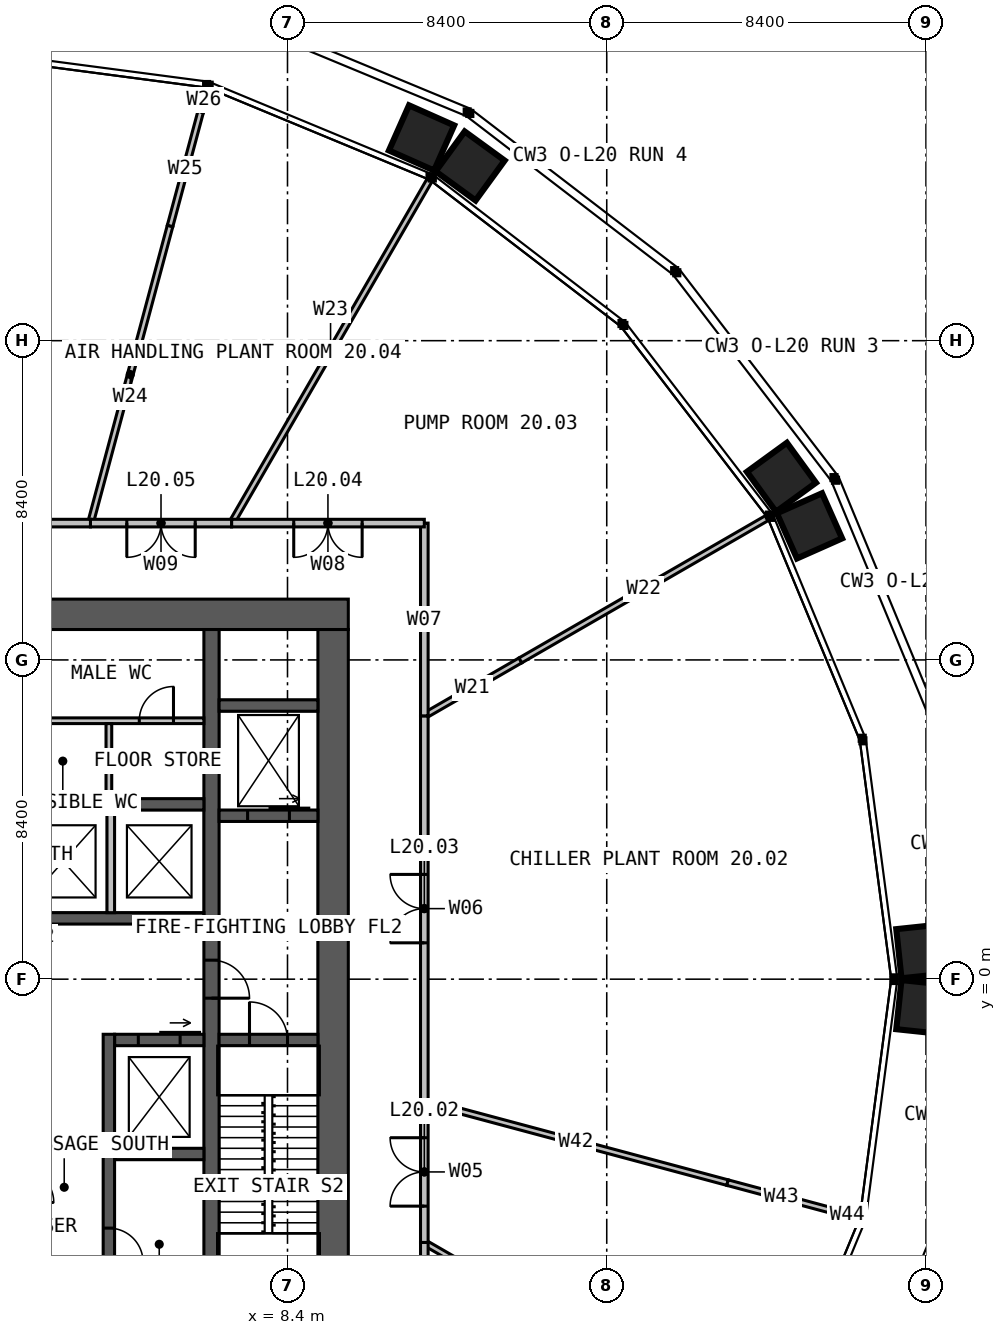
"""IFC4 building model, lengths in metres.
Left out: names, types, materials, properties, quantities, classifications, styles, units other than length and angle.
Written with IfcOpenShell. Run it as: python <this file> out.ifc"""

import sys

from ifc_helpers import new_model, si_unit, direction, frame, frame_2d, origin, place, context, subcontext, project, spatial, rectangle, extrude, element, fill, save


model = new_model("IFC4")
c1 = context("Model", 3, precision=1e-05, world=origin(), true_north=direction((0.0, 1.0)))
c2 = subcontext(c1, "Body", "Model", "MODEL_VIEW")
j1 = project(units=[si_unit("LENGTHUNIT", "METRE"), si_unit("PLANEANGLEUNIT", "RADIAN")], contexts=[c1])
p1 = place(None, origin())
s1 = spatial("IfcSite", under=j1, at=p1, CompositionType="ELEMENT")
p2 = place(p1, origin())
s2 = spatial("IfcBuilding", under=s1, at=p2, CompositionType="ELEMENT")
p3 = place(p2, frame((0.0, 0.0, 85.0)))
s3 = spatial("IfcBuildingStorey", under=s2, at=p3, CompositionType="ELEMENT", Elevation=85.0)
p4 = place(p3, frame((-10.0, 9.6, 0.0), z_axis=(0.0, 0.0, 1.0), x_axis=(1.0, 0.0, 0.0)))
e1 = element("IfcWall", 1, at=p4, inside=s3, PredefinedType="SOLIDWALL", context=c2, shape_type="SweptSolid", body=[
    extrude(rectangle(XDim=20.0, YDim=0.8, at=frame_2d((10.0, 0.0))), origin(), (0.0, 0.0, 1.0), 5.0),
])
p5 = place(p4, frame((9.4, 0.0, 0.0)))
e2 = element("IfcOpeningElement", 2, at=p5, cuts=e1, PredefinedType="OPENING", context=c2, shape_type="SweptSolid", body=[
    extrude(rectangle(XDim=1.2, YDim=2.2, at=frame_2d((0.6, 1.1))), frame((0.0, 0.41, 0.0), z_axis=(0.0, -1.0, 0.0), x_axis=(1.0, 0.0, 0.0)), (0.0, 0.0, 1.0), 0.82),
])
p6 = place(p3, frame((9.6, -9.2, 0.0), z_axis=(0.0, 0.0, 1.0), x_axis=(0.0, 1.0, 0.0)))
e3 = element("IfcWall", 3, at=p6, inside=s3, PredefinedType="SOLIDWALL", context=c2, shape_type="SweptSolid", body=[
    extrude(rectangle(XDim=18.4, YDim=0.8, at=frame_2d((9.2, 0.0))), origin(), (0.0, 0.0, 1.0), 5.0),
])
p7 = place(p3, frame((6.4, 9.2, 0.0), z_axis=(0.0, 0.0, 1.0), x_axis=(0.0, -1.0, 0.0)))
e4 = element("IfcWall", 4, at=p7, inside=s3, PredefinedType="SOLIDWALL", context=c2, shape_type="SweptSolid", body=[
    extrude(rectangle(XDim=18.4, YDim=0.4, at=frame_2d((9.2, 0.0))), origin(), (0.0, 0.0, 1.0), 5.0),
])
p8 = place(p7, frame((8.7, 0.0, 0.0)))
e5 = element("IfcOpeningElement", 5, at=p8, cuts=e4, PredefinedType="OPENING", context=c2, shape_type="SweptSolid", body=[
    extrude(rectangle(XDim=1.0, YDim=2.2, at=frame_2d((0.5, 1.1))), frame((0.0, 0.21, 0.0), z_axis=(0.0, -1.0, 0.0), x_axis=(1.0, 0.0, 0.0)), (0.0, 0.0, 1.0), 0.42),
])
for number, where, z_axis, x_axis in (
    (6, (1.35, 1.6, 0.0), (0.0, 0.0, 1.0), (1.0, 0.0, 0.0)),
    (7, (1.35, 4.6, 0.0), (0.0, 0.0, 1.0), (1.0, 0.0, 0.0)),
):
    element("IfcWall", number, at=place(p3, frame(where, z_axis=z_axis, x_axis=x_axis)), inside=s3, PredefinedType="SOLIDWALL", context=c2, shape_type="SweptSolid", body=[
        extrude(rectangle(XDim=4.85, YDim=0.3, at=frame_2d((2.425, 0.0))), origin(), (0.0, 0.0, 1.0), 5.0),
    ])
p9 = place(p3, frame((3.85, -1.6, 0.0), z_axis=(0.0, 0.0, 1.0), x_axis=(1.0, 0.0, 0.0)))
e8 = element("IfcWall", 8, at=p9, inside=s3, PredefinedType="SOLIDWALL", context=c2, shape_type="SweptSolid", body=[
    extrude(rectangle(XDim=2.35, YDim=0.3, at=frame_2d((1.175, 0.0))), origin(), (0.0, 0.0, 1.0), 5.0),
])
p10 = place(p9, frame((0.625, 0.0, 0.0)))
e9 = element("IfcOpeningElement", 9, at=p10, cuts=e8, PredefinedType="OPENING", context=c2, shape_type="SweptSolid", body=[
    extrude(rectangle(XDim=1.1, YDim=2.2, at=frame_2d((0.55, 1.1))), frame((0.0, 0.16, 0.0), z_axis=(0.0, -1.0, 0.0), x_axis=(1.0, 0.0, 0.0)), (0.0, 0.0, 1.0), 0.32),
])
p11 = place(p3, frame((3.85, -4.6, 0.0), z_axis=(0.0, 0.0, 1.0), x_axis=(1.0, 0.0, 0.0)))
e10 = element("IfcWall", 10, at=p11, inside=s3, PredefinedType="SOLIDWALL", context=c2, shape_type="SweptSolid", body=[
    extrude(rectangle(XDim=2.35, YDim=0.3, at=frame_2d((1.175, 0.0))), origin(), (0.0, 0.0, 1.0), 5.0),
])
p12 = place(p3, frame((3.7, -1.45, 0.0), z_axis=(0.0, 0.0, 1.0), x_axis=(0.0, -1.0, 0.0)))
e11 = element("IfcWall", 11, at=p12, inside=s3, PredefinedType="SOLIDWALL", context=c2, shape_type="SweptSolid", body=[
    extrude(rectangle(XDim=7.75, YDim=0.3, at=frame_2d((3.875, 0.0))), origin(), (0.0, 0.0, 1.0), 5.0),
])
p13 = place(p12, frame((5.1, 0.0, 0.0)))
e12 = element("IfcOpeningElement", 12, at=p13, cuts=e11, PredefinedType="OPENING", context=c2, shape_type="SweptSolid", body=[
    extrude(rectangle(XDim=0.9, YDim=2.2, at=frame_2d((0.45, 1.1))), frame((0.0, 0.16, 0.0), z_axis=(0.0, -1.0, 0.0), x_axis=(1.0, 0.0, 0.0)), (0.0, 0.0, 1.0), 0.32),
])
p14 = place(p3, frame((6.6, -1.6, 0.0), z_axis=(0.0, 0.0, 1.0), x_axis=(1.0, 0.0, 0.0)))
e13 = element("IfcWall", 13, at=p14, inside=s3, PredefinedType="SOLIDWALL", context=c2, shape_type="SweptSolid", body=[
    extrude(rectangle(XDim=2.6, YDim=0.3, at=frame_2d((1.3, 0.0))), origin(), (0.0, 0.0, 1.0), 5.0),
])
p15 = place(p14, frame((0.8, 0.0, 0.0)))
e14 = element("IfcOpeningElement", 14, at=p15, cuts=e13, PredefinedType="OPENING", context=c2, shape_type="SweptSolid", body=[
    extrude(rectangle(XDim=1.0, YDim=2.2, at=frame_2d((0.5, 1.1))), frame((0.0, 0.16, 0.0), z_axis=(0.0, -1.0, 0.0), x_axis=(1.0, 0.0, 0.0)), (0.0, 0.0, 1.0), 0.32),
])
p16 = place(p3, frame((6.6, 4.3, 0.0), z_axis=(0.0, 0.0, 1.0), x_axis=(1.0, 0.0, 0.0)))
e15 = element("IfcWall", 15, at=p16, inside=s3, PredefinedType="SOLIDWALL", context=c2, shape_type="SweptSolid", body=[
    extrude(rectangle(XDim=2.6, YDim=0.3, at=frame_2d((1.3, 0.0))), origin(), (0.0, 0.0, 1.0), 5.0),
])
p17 = place(p16, frame((0.75, 0.0, 0.0)))
e16 = element("IfcOpeningElement", 16, at=p17, cuts=e15, PredefinedType="OPENING", context=c2, shape_type="SweptSolid", body=[
    extrude(rectangle(XDim=1.1, YDim=2.2, at=frame_2d((0.55, 1.1))), frame((0.0, 0.16, 0.0), z_axis=(0.0, -1.0, 0.0), x_axis=(1.0, 0.0, 0.0)), (0.0, 0.0, 1.0), 0.32),
])
p18 = place(p3, frame((6.6, 7.2, 0.0), z_axis=(0.0, 0.0, 1.0), x_axis=(1.0, 0.0, 0.0)))
e17 = element("IfcWall", 17, at=p18, inside=s3, PredefinedType="SOLIDWALL", context=c2, shape_type="SweptSolid", body=[
    extrude(rectangle(XDim=2.6, YDim=0.3, at=frame_2d((1.3, 0.0))), origin(), (0.0, 0.0, 1.0), 5.0),
])
p19 = place(p3, frame((3.75, 1.75, 0.0), z_axis=(0.0, 0.0, 1.0), x_axis=(0.0, 1.0, 0.0)))
e18 = element("IfcWall", 18, at=p19, inside=s3, PredefinedType="SOLIDWALL", context=c2, shape_type="SweptSolid", body=[
    extrude(rectangle(XDim=2.7, YDim=0.2, at=frame_2d((1.35, 0.0))), origin(), (0.0, 0.0, 1.0), 4.75),
])
p20 = place(p3, frame((1.35, 6.8, 0.0), z_axis=(0.0, 0.0, 1.0), x_axis=(1.0, 0.0, 0.0)))
e19 = element("IfcWall", 19, at=p20, inside=s3, PredefinedType="PARTITIONING", context=c2, shape_type="SweptSolid", body=[
    extrude(rectangle(XDim=4.85, YDim=0.15, at=frame_2d((2.425, 0.0))), origin(), (0.0, 0.0, 1.0), 4.75),
])
p21 = place(p20, frame((3.15, 0.0, 0.0)))
e20 = element("IfcOpeningElement", 20, at=p21, cuts=e19, PredefinedType="OPENING", context=c2, shape_type="SweptSolid", body=[
    extrude(rectangle(XDim=0.9, YDim=2.2, at=frame_2d((0.45, 1.1))), frame((0.0, 0.085, 0.0), z_axis=(0.0, -1.0, 0.0), x_axis=(1.0, 0.0, 0.0)), (0.0, 0.0, 1.0), 0.17),
])
p22 = place(p3, frame((3.7, 4.75, 0.0), z_axis=(0.0, 0.0, 1.0), x_axis=(0.0, 1.0, 0.0)))
e21 = element("IfcWall", 21, at=p22, inside=s3, PredefinedType="PARTITIONING", context=c2, shape_type="SweptSolid", body=[
    extrude(rectangle(XDim=1.975, YDim=0.15, at=frame_2d((0.988, 0.0))), origin(), (0.0, 0.0, 1.0), 4.75),
])
p23 = place(p3, frame((12.0, -6.928, 0.0), z_axis=(0.0, 0.0, 1.0), x_axis=(0.866026830048, -0.499997529631, 0.0)))
e22 = element("IfcWall", 22, at=p23, inside=s3, PredefinedType="PARTITIONING", context=c2, shape_type="SweptSolid", body=[
    extrude(rectangle(XDim=2.919, YDim=0.15, at=frame_2d((1.46, 0.0))), origin(), (0.0, 0.0, 1.0), 3.79),
])
p24 = place(p3, frame((12.0, -3.215, 0.0), z_axis=(0.0, 0.0, 1.0), x_axis=(0.965926149295, -0.258817839624, 0.0)))
e23 = element("IfcWall", 23, at=p24, inside=s3, PredefinedType="PARTITIONING", context=c2, shape_type="SweptSolid", body=[
    extrude(rectangle(XDim=8.26, YDim=0.15, at=frame_2d((4.13, 0.0))), origin(), (0.0, 0.0, 1.0), 4.8),
])
p25 = place(p3, frame((19.978, -5.353, 0.0), z_axis=(0.0, 0.0, 1.0), x_axis=(0.965910471853, -0.258876341839, 0.0)))
e24 = element("IfcWall", 24, at=p25, inside=s3, PredefinedType="PARTITIONING", context=c2, shape_type="SweptSolid", body=[
    extrude(rectangle(XDim=2.929, YDim=0.15, at=frame_2d((1.465, 0.0))), origin(), (0.0, 0.0, 1.0), 3.79),
])
p26 = place(p3, frame((22.807, -6.111, 0.0), z_axis=(0.0, 0.0, 1.0), x_axis=(0.965934907189, -0.258785152345, 0.0)))
e25 = element("IfcWall", 25, at=p26, inside=s3, PredefinedType="PARTITIONING", context=c2, shape_type="SweptSolid", body=[
    extrude(rectangle(XDim=0.663, YDim=0.15, at=frame_2d((0.332, 0.0))), origin(), (0.0, 0.0, 1.0), 4.8),
])
p27 = place(p3, frame((12.0, 6.928, 0.0), z_axis=(0.0, 0.0, 1.0), x_axis=(0.866026830048, 0.499997529631, 0.0)))
e26 = element("IfcWall", 26, at=p27, inside=s3, PredefinedType="PARTITIONING", context=c2, shape_type="SweptSolid", body=[
    extrude(rectangle(XDim=2.919, YDim=0.15, at=frame_2d((1.46, 0.0))), origin(), (0.0, 0.0, 1.0), 3.79),
])
p28 = place(p3, frame((14.528, 8.388, 0.0), z_axis=(0.0, 0.0, 1.0), x_axis=(0.8660207781, 0.500008011835, 0.0)))
e27 = element("IfcWall", 27, at=p28, inside=s3, PredefinedType="PARTITIONING", context=c2, shape_type="SweptSolid", body=[
    extrude(rectangle(XDim=7.5, YDim=0.15, at=frame_2d((3.75, 0.0))), origin(), (0.0, 0.0, 1.0), 4.8),
])
p29 = place(p3, frame((6.928, 12.0, 0.0), z_axis=(0.0, 0.0, 1.0), x_axis=(0.500005074639, 0.86602247392, 0.0)))
e28 = element("IfcWall", 28, at=p29, inside=s3, PredefinedType="PARTITIONING", context=c2, shape_type="SweptSolid", body=[
    extrude(rectangle(XDim=10.419, YDim=0.15, at=frame_2d((5.209, 0.0))), origin(), (0.0, 0.0, 1.0), 4.8),
])
p30 = place(p3, frame((3.215, 12.0, 0.0), z_axis=(0.0, 0.0, 1.0), x_axis=(0.258830053586, 0.965922876508, 0.0)))
e29 = element("IfcWall", 29, at=p30, inside=s3, PredefinedType="PARTITIONING", context=c2, shape_type="SweptSolid", body=[
    extrude(rectangle(XDim=8.095, YDim=0.15, at=frame_2d((4.047, 0.0))), origin(), (0.0, 0.0, 1.0), 4.8),
])
p31 = place(p3, frame((5.311, 19.819, 0.0), z_axis=(0.0, 0.0, 1.0), x_axis=(0.258835525839, 0.965921410138, 0.0)))
e30 = element("IfcWall", 30, at=p31, inside=s3, PredefinedType="PARTITIONING", context=c2, shape_type="SweptSolid", body=[
    extrude(rectangle(XDim=3.109, YDim=0.15, at=frame_2d((1.554, 0.0))), origin(), (0.0, 0.0, 1.0), 3.79),
])
p32 = place(p3, frame((6.115, 22.822, 0.0), z_axis=(0.0, 0.0, 1.0), x_axis=(0.258811407408, 0.965927872771, 0.0)))
e31 = element("IfcWall", 31, at=p32, inside=s3, PredefinedType="PARTITIONING", context=c2, shape_type="SweptSolid", body=[
    extrude(rectangle(XDim=0.648, YDim=0.15, at=frame_2d((0.324, 0.0))), origin(), (0.0, 0.0, 1.0), 4.8),
])
p33 = place(p3, frame((12.0, -6.928, 0.0), z_axis=(0.0, 0.0, 1.0), x_axis=(0.0, 1.0, 0.0)))
e32 = element("IfcWall", 32, at=p33, inside=s3, PredefinedType="PARTITIONING", context=c2, shape_type="SweptSolid", body=[
    extrude(rectangle(XDim=3.713, YDim=0.2, at=frame_2d((1.856, 0.0))), origin(), (0.0, 0.0, 1.0), 4.8),
])
p34 = place(p33, frame((0.956, 0.0, 0.0)))
e33 = element("IfcOpeningElement", 33, at=p34, cuts=e32, PredefinedType="OPENING", context=c2, shape_type="SweptSolid", body=[
    extrude(rectangle(XDim=1.8, YDim=2.2, at=frame_2d((0.9, 1.1))), frame((0.0, 0.11, 0.0), z_axis=(0.0, -1.0, 0.0), x_axis=(1.0, 0.0, 0.0)), (0.0, 0.0, 1.0), 0.22),
])
p35 = place(p3, frame((12.0, -3.215, 0.0), z_axis=(0.0, 0.0, 1.0), x_axis=(0.0, 1.0, 0.0)))
e34 = element("IfcWall", 34, at=p35, inside=s3, PredefinedType="PARTITIONING", context=c2, shape_type="SweptSolid", body=[
    extrude(rectangle(XDim=10.144, YDim=0.2, at=frame_2d((5.072, 0.0))), origin(), (0.0, 0.0, 1.0), 4.8),
])
p36 = place(p35, frame((4.172, 0.0, 0.0)))
e35 = element("IfcOpeningElement", 35, at=p36, cuts=e34, PredefinedType="OPENING", context=c2, shape_type="SweptSolid", body=[
    extrude(rectangle(XDim=1.8, YDim=2.2, at=frame_2d((0.9, 1.1))), frame((0.0, 0.11, 0.0), z_axis=(0.0, -1.0, 0.0), x_axis=(1.0, 0.0, 0.0)), (0.0, 0.0, 1.0), 0.22),
])
p37 = place(p3, frame((12.0, 6.928, 0.0), z_axis=(0.0, 0.0, 1.0), x_axis=(0.0, 1.0, 0.0)))
e36 = element("IfcWall", 36, at=p37, inside=s3, PredefinedType="PARTITIONING", context=c2, shape_type="SweptSolid", body=[
    extrude(rectangle(XDim=5.072, YDim=0.2, at=frame_2d((2.536, 0.0))), origin(), (0.0, 0.0, 1.0), 4.8),
])
p38 = place(p3, frame((12.0, 12.0, 0.0), z_axis=(0.0, 0.0, 1.0), x_axis=(-1.0, 0.0, 0.0)))
e37 = element("IfcWall", 37, at=p38, inside=s3, PredefinedType="PARTITIONING", context=c2, shape_type="SweptSolid", body=[
    extrude(rectangle(XDim=5.072, YDim=0.2, at=frame_2d((2.536, 0.0))), origin(), (0.0, 0.0, 1.0), 4.8),
])
p39 = place(p38, frame((1.636, 0.0, 0.0)))
e38 = element("IfcOpeningElement", 38, at=p39, cuts=e37, PredefinedType="OPENING", context=c2, shape_type="SweptSolid", body=[
    extrude(rectangle(XDim=1.8, YDim=2.2, at=frame_2d((0.9, 1.1))), frame((0.0, 0.11, 0.0), z_axis=(0.0, -1.0, 0.0), x_axis=(1.0, 0.0, 0.0)), (0.0, 0.0, 1.0), 0.22),
])
p40 = place(p3, frame((6.928, 12.0, 0.0), z_axis=(0.0, 0.0, 1.0), x_axis=(-1.0, 0.0, 0.0)))
e39 = element("IfcWall", 39, at=p40, inside=s3, PredefinedType="PARTITIONING", context=c2, shape_type="SweptSolid", body=[
    extrude(rectangle(XDim=3.713, YDim=0.2, at=frame_2d((1.856, 0.0))), origin(), (0.0, 0.0, 1.0), 4.8),
])
p41 = place(p40, frame((0.956, 0.0, 0.0)))
e40 = element("IfcOpeningElement", 40, at=p41, cuts=e39, PredefinedType="OPENING", context=c2, shape_type="SweptSolid", body=[
    extrude(rectangle(XDim=1.8, YDim=2.2, at=frame_2d((0.9, 1.1))), frame((0.0, 0.11, 0.0), z_axis=(0.0, -1.0, 0.0), x_axis=(1.0, 0.0, 0.0)), (0.0, 0.0, 1.0), 0.22),
])
p42 = place(p3, frame((3.215, 12.0, 0.0), z_axis=(0.0, 0.0, 1.0), x_axis=(-1.0, 0.0, 0.0)))
e41 = element("IfcWall", 41, at=p42, inside=s3, PredefinedType="PARTITIONING", context=c2, shape_type="SweptSolid", body=[
    extrude(rectangle(XDim=10.144, YDim=0.2, at=frame_2d((5.072, 0.0))), origin(), (0.0, 0.0, 1.0), 4.8),
])
p43 = place(p42, frame((4.172, 0.0, 0.0)))
e42 = element("IfcOpeningElement", 42, at=p43, cuts=e41, PredefinedType="OPENING", context=c2, shape_type="SweptSolid", body=[
    extrude(rectangle(XDim=1.8, YDim=2.2, at=frame_2d((0.9, 1.1))), frame((0.0, 0.11, 0.0), z_axis=(0.0, -1.0, 0.0), x_axis=(1.0, 0.0, 0.0)), (0.0, 0.0, 1.0), 0.22),
])
p44 = place(p3, frame((12.0, -12.0, 0.0), z_axis=(0.0, 0.0, 1.0), x_axis=(0.0, 1.0, 0.0)))
e43 = element("IfcWall", 43, at=p44, inside=s3, PredefinedType="PARTITIONING", context=c2, shape_type="SweptSolid", body=[
    extrude(rectangle(XDim=5.072, YDim=0.2, at=frame_2d((2.536, 0.0))), origin(), (0.0, 0.0, 1.0), 4.8),
])
p45 = place(p8, origin())
e44 = element("IfcDoor", 44, at=p45, inside=s3, OperationType="SINGLE_SWING_RIGHT", PredefinedType="DOOR", context=c2, shape_type="SweptSolid", body=[
    extrude(rectangle(XDim=1.0, YDim=2.2, at=frame_2d((0.5, 1.1))), frame((0.0, 0.025, 0.0), z_axis=(0.0, -1.0, 0.0), x_axis=(1.0, 0.0, 0.0)), (0.0, 0.0, 1.0), 0.05),
])
fill(e5, e44)
p46 = place(p15, origin())
e45 = element("IfcDoor", 45, at=p46, inside=s3, OperationType="SINGLE_SWING_LEFT", PredefinedType="DOOR", context=c2, shape_type="SweptSolid", body=[
    extrude(rectangle(XDim=1.0, YDim=2.2, at=frame_2d((0.5, 1.1))), frame((0.0, 0.025, 0.0), z_axis=(0.0, -1.0, 0.0), x_axis=(1.0, 0.0, 0.0)), (0.0, 0.0, 1.0), 0.05),
])
fill(e14, e45)
p47 = place(p13, origin())
e46 = element("IfcDoor", 46, at=p47, inside=s3, OperationType="SINGLE_SWING_RIGHT", PredefinedType="DOOR", context=c2, shape_type="SweptSolid", body=[
    extrude(rectangle(XDim=0.9, YDim=2.2, at=frame_2d((0.45, 1.1))), frame((0.0, 0.025, 0.0), z_axis=(0.0, -1.0, 0.0), x_axis=(1.0, 0.0, 0.0)), (0.0, 0.0, 1.0), 0.05),
])
fill(e12, e46)
p48 = place(p21, origin())
e47 = element("IfcDoor", 47, at=p48, inside=s3, OperationType="SINGLE_SWING_RIGHT", PredefinedType="DOOR", context=c2, shape_type="SweptSolid", body=[
    extrude(rectangle(XDim=0.9, YDim=2.2, at=frame_2d((0.45, 1.1))), frame((0.0, 0.025, 0.0), z_axis=(0.0, -1.0, 0.0), x_axis=(1.0, 0.0, 0.0)), (0.0, 0.0, 1.0), 0.05),
])
fill(e20, e47)
p49 = place(p10, origin())
e48 = element("IfcDoor", 48, at=p49, inside=s3, OperationType="SLIDING_TO_LEFT", PredefinedType="DOOR", context=c2, shape_type="SweptSolid", body=[
    extrude(rectangle(XDim=1.1, YDim=2.2, at=frame_2d((0.55, 1.1))), frame((0.0, 0.025, 0.0), z_axis=(0.0, -1.0, 0.0), x_axis=(1.0, 0.0, 0.0)), (0.0, 0.0, 1.0), 0.05),
])
fill(e9, e48)
p50 = place(p17, origin())
e49 = element("IfcDoor", 49, at=p50, inside=s3, OperationType="SLIDING_TO_LEFT", PredefinedType="DOOR", context=c2, shape_type="SweptSolid", body=[
    extrude(rectangle(XDim=1.1, YDim=2.2, at=frame_2d((0.55, 1.1))), frame((0.0, 0.025, 0.0), z_axis=(0.0, -1.0, 0.0), x_axis=(1.0, 0.0, 0.0)), (0.0, 0.0, 1.0), 0.05),
])
fill(e16, e49)
p51 = place(p34, origin())
e50 = element("IfcDoor", 50, at=p51, inside=s3, OperationType="DOUBLE_DOOR_SINGLE_SWING", PredefinedType="DOOR", context=c2, shape_type="SweptSolid", body=[
    extrude(rectangle(XDim=1.8, YDim=2.2, at=frame_2d((0.9, 1.1))), frame((0.0, 0.025, 0.0), z_axis=(0.0, -1.0, 0.0), x_axis=(1.0, 0.0, 0.0)), (0.0, 0.0, 1.0), 0.05),
])
fill(e33, e50)
p52 = place(p36, origin())
e51 = element("IfcDoor", 51, at=p52, inside=s3, OperationType="DOUBLE_DOOR_SINGLE_SWING", PredefinedType="DOOR", context=c2, shape_type="SweptSolid", body=[
    extrude(rectangle(XDim=1.8, YDim=2.2, at=frame_2d((0.9, 1.1))), frame((0.0, 0.025, 0.0), z_axis=(0.0, -1.0, 0.0), x_axis=(1.0, 0.0, 0.0)), (0.0, 0.0, 1.0), 0.05),
])
fill(e35, e51)
p53 = place(p39, origin())
e52 = element("IfcDoor", 52, at=p53, inside=s3, OperationType="DOUBLE_DOOR_SINGLE_SWING", PredefinedType="DOOR", context=c2, shape_type="SweptSolid", body=[
    extrude(rectangle(XDim=1.8, YDim=2.2, at=frame_2d((0.9, 1.1))), frame((0.0, 0.025, 0.0), z_axis=(0.0, -1.0, 0.0), x_axis=(1.0, 0.0, 0.0)), (0.0, 0.0, 1.0), 0.05),
])
fill(e38, e52)
p54 = place(p41, origin())
e53 = element("IfcDoor", 53, at=p54, inside=s3, OperationType="DOUBLE_DOOR_SINGLE_SWING", PredefinedType="DOOR", context=c2, shape_type="SweptSolid", body=[
    extrude(rectangle(XDim=1.8, YDim=2.2, at=frame_2d((0.9, 1.1))), frame((0.0, 0.025, 0.0), z_axis=(0.0, -1.0, 0.0), x_axis=(1.0, 0.0, 0.0)), (0.0, 0.0, 1.0), 0.05),
])
fill(e40, e53)
save(model, sys.argv[1])
